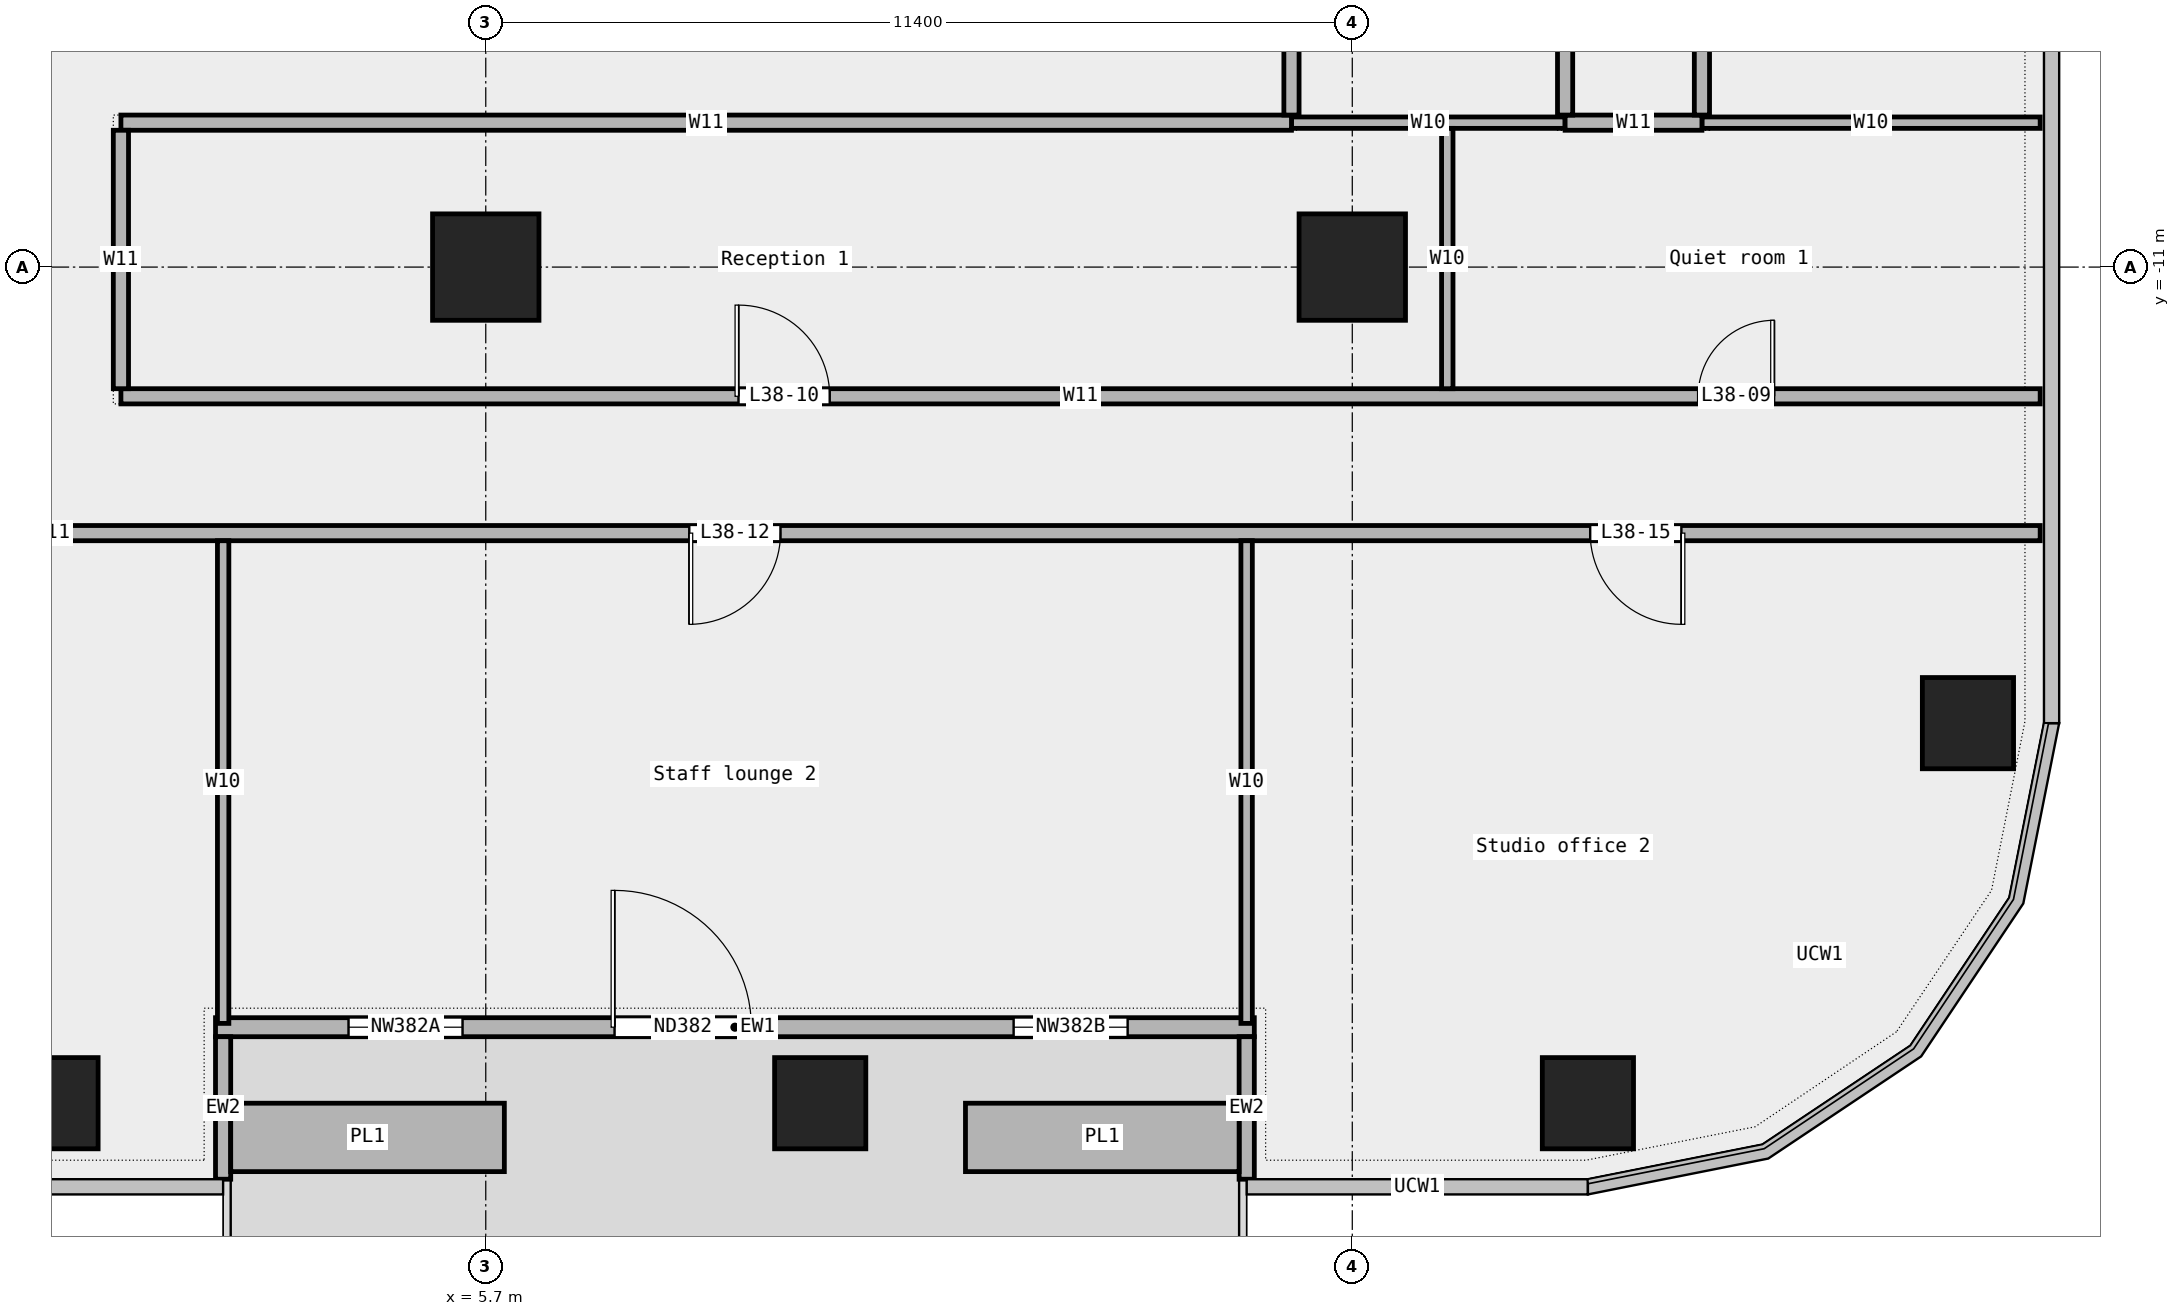
"""IFC4 building model, lengths in metres.
Left out: names, types, materials, properties, quantities, classifications, styles, units other than length and angle.
Written with IfcOpenShell. Run it as: python <this file> out.ifc"""

import sys

from ifc_helpers import new_model, si_unit, direction, frame, frame_2d, origin, origin_2d, place, context, subcontext, project, spatial, rectangle, extrude, element, fill, save


model = new_model("IFC4")
c1 = context("Model", 3, precision=1e-05, world=origin(), true_north=direction((0.0, 1.0)))
c2 = subcontext(c1, "Body", "Model", "MODEL_VIEW")
j1 = project(units=[si_unit("LENGTHUNIT", "METRE"), si_unit("PLANEANGLEUNIT", "RADIAN")], contexts=[c1])
p1 = place(None, origin())
s1 = spatial("IfcSite", under=j1, at=p1, CompositionType="ELEMENT")
p2 = place(p1, origin())
s2 = spatial("IfcBuilding", under=s1, at=p2, CompositionType="ELEMENT")
p3 = place(p2, frame((0.0, 0.0, 185.0)))
s3 = spatial("IfcBuildingStorey", under=s2, at=p3, CompositionType="ELEMENT", Elevation=185.0)
for number, where, z_axis, x_axis in (
    (1, (0.0, -22.0, 0.0), (0.0, 0.0, 1.0), (1.0, 0.0, 0.0)),
    (2, (10.1, -22.0, 0.0), (0.0, 0.0, 1.0), (1.0, 0.0, 0.0)),
    (3, (20.2, -22.0, 0.0), (0.0, 0.0, 1.0), (1.0, 0.0, 0.0)),
    (4, (25.2, -17.0, 0.0), (0.0, 0.0, 1.0), (1.0, 0.0, 0.0)),
):
    element("IfcColumn", number, at=place(p3, frame(where, z_axis=z_axis, x_axis=x_axis)), inside=s3, PredefinedType="COLUMN", context=c2, shape_type="SweptSolid", body=[
        extrude(rectangle(XDim=1.2, YDim=1.2, at=origin_2d()), origin(), (0.0, 0.0, 1.0), 3.6),
    ])
for number, where, z_axis, x_axis in (
    (5, (5.7, -11.0, 0.0), (0.0, 0.0, 1.0), (1.0, 0.0, 0.0)),
    (6, (17.1, -11.0, 0.0), (0.0, 0.0, 1.0), (1.0, 0.0, 0.0)),
):
    element("IfcColumn", number, at=place(p3, frame(where, z_axis=z_axis, x_axis=x_axis)), inside=s3, PredefinedType="COLUMN", context=c2, shape_type="SweptSolid", body=[
        extrude(rectangle(XDim=1.4, YDim=1.4, at=origin_2d()), origin(), (0.0, 0.0, 1.0), 3.6),
    ])
p4 = place(p3, frame((2.145, -21.0, 0.0), z_axis=(0.0, 0.0, 1.0), x_axis=(1.0, 0.0, 0.0)))
e7 = element("IfcWall", 7, at=p4, inside=s3, PredefinedType="STANDARD", context=c2, shape_type="SweptSolid", body=[
    extrude(rectangle(XDim=13.667, YDim=0.25, at=frame_2d((6.833, 0.0))), origin(), (0.0, 0.0, 1.0), 3.6),
])
p5 = place(p4, frame((1.75, 0.0, 0.45)))
e8 = element("IfcOpeningElement", 8, at=p5, cuts=e7, PredefinedType="OPENING", context=c2, shape_type="SweptSolid", body=[
    extrude(rectangle(XDim=1.5, YDim=2.4, at=frame_2d((0.75, 1.2))), frame((0.0, 0.137, 0.0), z_axis=(0.0, -1.0, 0.0), x_axis=(1.0, 0.0, 0.0)), (0.0, 0.0, 1.0), 0.274),
])
p6 = place(p4, frame((5.25, 0.0, 0.0)))
e9 = element("IfcOpeningElement", 9, at=p6, cuts=e7, PredefinedType="OPENING", context=c2, shape_type="SweptSolid", body=[
    extrude(rectangle(XDim=1.8, YDim=2.4, at=frame_2d((0.9, 1.2))), frame((0.0, 0.137, 0.0), z_axis=(0.0, -1.0, 0.0), x_axis=(1.0, 0.0, 0.0)), (0.0, 0.0, 1.0), 0.274),
])
p7 = place(p4, frame((10.5, 0.0, 0.45)))
e10 = element("IfcOpeningElement", 10, at=p7, cuts=e7, PredefinedType="OPENING", context=c2, shape_type="SweptSolid", body=[
    extrude(rectangle(XDim=1.5, YDim=2.4, at=frame_2d((0.75, 1.2))), frame((0.0, 0.137, 0.0), z_axis=(0.0, -1.0, 0.0), x_axis=(1.0, 0.0, 0.0)), (0.0, 0.0, 1.0), 0.274),
])
for number, where, z_axis, x_axis in (
    (11, (2.244, -23.0, 0.0), (0.0, 0.0, 1.0), (0.0, 1.0, 0.0)),
    (12, (15.711, -23.0, 0.0), (0.0, 0.0, 1.0), (0.0, 1.0, 0.0)),
):
    element("IfcWall", number, at=place(p3, frame(where, z_axis=z_axis, x_axis=x_axis)), inside=s3, PredefinedType="STANDARD", context=c2, shape_type="SweptSolid", body=[
        extrude(rectangle(XDim=1.875, YDim=0.2, at=frame_2d((0.938, 0.0))), origin(), (0.0, 0.0, 1.0), 3.6),
    ])
for number, where, z_axis, x_axis in (
    (13, (2.344, -22.45, 0.0), (0.0, 0.0, 1.0), (1.0, 0.0, 0.0)),
    (14, (12.011, -22.45, 0.0), (0.0, 0.0, 1.0), (1.0, 0.0, 0.0)),
):
    element("IfcWall", number, at=place(p3, frame(where, z_axis=z_axis, x_axis=x_axis)), inside=s3, PredefinedType="STANDARD", context=c2, shape_type="SweptSolid", body=[
        extrude(rectangle(XDim=3.6, YDim=0.9, at=frame_2d((1.8, 0.0))), origin(), (0.0, 0.0, 1.0), 0.7),
    ])
p8 = place(p3, frame((-26.15, -14.5, 0.0), z_axis=(0.0, 0.0, 1.0), x_axis=(1.0, 0.0, 0.0)))
e15 = element("IfcWall", 15, at=p8, inside=s3, PredefinedType="PARTITIONING", context=c2, shape_type="SweptSolid", body=[
    extrude(rectangle(XDim=52.3, YDim=0.2, at=frame_2d((26.15, 0.0))), origin(), (0.0, 0.0, 1.0), 3.6),
])
p9 = place(p8, frame((34.528, 0.0, 0.0)))
e16 = element("IfcOpeningElement", 16, at=p9, cuts=e15, PredefinedType="OPENING", context=c2, shape_type="SweptSolid", body=[
    extrude(rectangle(XDim=1.2, YDim=2.1, at=frame_2d((0.6, 1.05))), frame((0.0, 0.112, 0.0), z_axis=(0.0, -1.0, 0.0), x_axis=(1.0, 0.0, 0.0)), (0.0, 0.0, 1.0), 0.224),
])
p10 = place(p8, frame((13.397, 0.0, 0.0)))
e17 = element("IfcOpeningElement", 17, at=p10, cuts=e15, PredefinedType="OPENING", context=c2, shape_type="SweptSolid", body=[
    extrude(rectangle(XDim=1.8, YDim=2.1, at=frame_2d((0.9, 1.05))), frame((0.0, 0.112, 0.0), z_axis=(0.0, -1.0, 0.0), x_axis=(1.0, 0.0, 0.0)), (0.0, 0.0, 1.0), 0.224),
])
p11 = place(p8, frame((46.38, 0.0, 0.0)))
e18 = element("IfcOpeningElement", 18, at=p11, cuts=e15, PredefinedType="OPENING", context=c2, shape_type="SweptSolid", body=[
    extrude(rectangle(XDim=1.2, YDim=2.1, at=frame_2d((0.6, 1.05))), frame((0.0, 0.112, 0.0), z_axis=(0.0, -1.0, 0.0), x_axis=(1.0, 0.0, 0.0)), (0.0, 0.0, 1.0), 0.224),
])
p12 = place(p3, frame((0.9, -12.7, 0.0), z_axis=(0.0, 0.0, 1.0), x_axis=(1.0, 0.0, 0.0)))
e19 = element("IfcWall", 19, at=p12, inside=s3, PredefinedType="PARTITIONING", context=c2, shape_type="SweptSolid", body=[
    extrude(rectangle(XDim=25.25, YDim=0.2, at=frame_2d((12.625, 0.0))), origin(), (0.0, 0.0, 1.0), 3.6),
])
p13 = place(p12, frame((20.75, 0.0, 0.0)))
e20 = element("IfcOpeningElement", 20, at=p13, cuts=e19, PredefinedType="OPENING", context=c2, shape_type="SweptSolid", body=[
    extrude(rectangle(XDim=1.0, YDim=2.1, at=frame_2d((0.5, 1.05))), frame((0.0, 0.112, 0.0), z_axis=(0.0, -1.0, 0.0), x_axis=(1.0, 0.0, 0.0)), (0.0, 0.0, 1.0), 0.224),
])
p14 = place(p12, frame((8.125, 0.0, 0.0)))
e21 = element("IfcOpeningElement", 21, at=p14, cuts=e19, PredefinedType="OPENING", context=c2, shape_type="SweptSolid", body=[
    extrude(rectangle(XDim=1.2, YDim=2.1, at=frame_2d((0.6, 1.05))), frame((0.0, 0.112, 0.0), z_axis=(0.0, -1.0, 0.0), x_axis=(1.0, 0.0, 0.0)), (0.0, 0.0, 1.0), 0.224),
])
p15 = place(p3, frame((16.3, -9.1, 0.0), z_axis=(0.0, 0.0, 1.0), x_axis=(1.0, 0.0, 0.0)))
e22 = element("IfcWall", 22, at=p15, inside=s3, PredefinedType="PARTITIONING", context=c2, shape_type="SweptSolid", body=[
    extrude(rectangle(XDim=3.6, YDim=0.15, at=frame_2d((1.8, 0.0))), origin(), (0.0, 0.0, 1.0), 3.6),
])
p16 = place(p3, frame((21.7, -9.1, 0.0), z_axis=(0.0, 0.0, 1.0), x_axis=(1.0, 0.0, 0.0)))
e23 = element("IfcWall", 23, at=p16, inside=s3, PredefinedType="PARTITIONING", context=c2, shape_type="SweptSolid", body=[
    extrude(rectangle(XDim=4.45, YDim=0.15, at=frame_2d((2.225, 0.0))), origin(), (0.0, 0.0, 1.0), 3.6),
])
p17 = place(p3, frame((0.9, -9.1, 0.0), z_axis=(0.0, 0.0, 1.0), x_axis=(1.0, 0.0, 0.0)))
e24 = element("IfcWall", 24, at=p17, inside=s3, PredefinedType="PARTITIONING", context=c2, shape_type="SweptSolid", body=[
    extrude(rectangle(XDim=15.4, YDim=0.2, at=frame_2d((7.7, 0.0))), origin(), (0.0, 0.0, 1.0), 3.6),
])
p18 = place(p3, frame((19.9, -9.1, 0.0), z_axis=(0.0, 0.0, 1.0), x_axis=(1.0, 0.0, 0.0)))
e25 = element("IfcWall", 25, at=p18, inside=s3, PredefinedType="PARTITIONING", context=c2, shape_type="SweptSolid", body=[
    extrude(rectangle(XDim=1.8, YDim=0.2, at=frame_2d((0.9, 0.0))), origin(), (0.0, 0.0, 1.0), 3.6),
])
p19 = place(p3, frame((0.9, -12.6, 0.0), z_axis=(0.0, 0.0, 1.0), x_axis=(0.0, 1.0, 0.0)))
e26 = element("IfcWall", 26, at=p19, inside=s3, PredefinedType="PARTITIONING", context=c2, shape_type="SweptSolid", body=[
    extrude(rectangle(XDim=3.4, YDim=0.2, at=frame_2d((1.7, 0.0))), origin(), (0.0, 0.0, 1.0), 3.6),
])
for number, where, z_axis, x_axis in (
    (27, (2.245, -20.95, 0.0), (0.0, 0.0, 1.0), (0.0, 1.0, 0.0)),
    (28, (15.71, -20.95, 0.0), (0.0, 0.0, 1.0), (0.0, 1.0, 0.0)),
):
    element("IfcWall", number, at=place(p3, frame(where, z_axis=z_axis, x_axis=x_axis)), inside=s3, PredefinedType="PARTITIONING", context=c2, shape_type="SweptSolid", body=[
        extrude(rectangle(XDim=6.35, YDim=0.15, at=frame_2d((3.175, 0.0))), origin(), (0.0, 0.0, 1.0), 3.6),
    ])
p20 = place(p3, frame((16.3, -9.0, 0.0), z_axis=(0.0, 0.0, 1.0), x_axis=(0.0, 1.0, 0.0)))
e29 = element("IfcWall", 29, at=p20, inside=s3, PredefinedType="PARTITIONING", context=c2, shape_type="SweptSolid", body=[
    extrude(rectangle(XDim=8.3, YDim=0.2, at=frame_2d((4.15, 0.0))), origin(), (0.0, 0.0, 1.0), 3.6),
])
p21 = place(p3, frame((18.35, -12.6, 0.0), z_axis=(0.0, 0.0, 1.0), x_axis=(0.0, 1.0, 0.0)))
e30 = element("IfcWall", 30, at=p21, inside=s3, PredefinedType="PARTITIONING", context=c2, shape_type="SweptSolid", body=[
    extrude(rectangle(XDim=3.425, YDim=0.15, at=frame_2d((1.712, 0.0))), origin(), (0.0, 0.0, 1.0), 3.6),
])
p22 = place(p3, frame((19.9, -9.0, 0.0), z_axis=(0.0, 0.0, 1.0), x_axis=(0.0, 1.0, 0.0)))
e31 = element("IfcWall", 31, at=p22, inside=s3, PredefinedType="PARTITIONING", context=c2, shape_type="SweptSolid", body=[
    extrude(rectangle(XDim=9.95, YDim=0.2, at=frame_2d((4.975, 0.0))), origin(), (0.0, 0.0, 1.0), 3.6),
])
p23 = place(p22, frame((1.942, 0.0, 0.0)))
e32 = element("IfcOpeningElement", 32, at=p23, cuts=e31, PredefinedType="OPENING", context=c2, shape_type="SweptSolid", body=[
    extrude(rectangle(XDim=0.9, YDim=2.1, at=frame_2d((0.45, 1.05))), frame((0.0, 0.112, 0.0), z_axis=(0.0, -1.0, 0.0), x_axis=(1.0, 0.0, 0.0)), (0.0, 0.0, 1.0), 0.224),
])
p24 = place(p22, frame((6.917, 0.0, 0.0)))
e33 = element("IfcOpeningElement", 33, at=p24, cuts=e31, PredefinedType="OPENING", context=c2, shape_type="SweptSolid", body=[
    extrude(rectangle(XDim=0.9, YDim=2.1, at=frame_2d((0.45, 1.05))), frame((0.0, 0.112, 0.0), z_axis=(0.0, -1.0, 0.0), x_axis=(1.0, 0.0, 0.0)), (0.0, 0.0, 1.0), 0.224),
])
p25 = place(p3, frame((21.7, -9.0, 0.0), z_axis=(0.0, 0.0, 1.0), x_axis=(0.0, 1.0, 0.0)))
e34 = element("IfcWall", 34, at=p25, inside=s3, PredefinedType="PARTITIONING", context=c2, shape_type="SweptSolid", body=[
    extrude(rectangle(XDim=24.3, YDim=0.2, at=frame_2d((12.15, 0.0))), origin(), (0.0, 0.0, 1.0), 3.6),
])
p26 = place(p25, frame((18.155, 0.0, 0.0)))
e35 = element("IfcOpeningElement", 35, at=p26, cuts=e34, PredefinedType="OPENING", context=c2, shape_type="SweptSolid", body=[
    extrude(rectangle(XDim=1.5, YDim=2.1, at=frame_2d((0.75, 1.05))), frame((0.0, 0.112, 0.0), z_axis=(0.0, -1.0, 0.0), x_axis=(1.0, 0.0, 0.0)), (0.0, 0.0, 1.0), 0.224),
])
p27 = place(p25, frame((6.155, 0.0, 0.0)))
e36 = element("IfcOpeningElement", 36, at=p27, cuts=e34, PredefinedType="OPENING", context=c2, shape_type="SweptSolid", body=[
    extrude(rectangle(XDim=1.2, YDim=2.1, at=frame_2d((0.6, 1.05))), frame((0.0, 0.112, 0.0), z_axis=(0.0, -1.0, 0.0), x_axis=(1.0, 0.0, 0.0)), (0.0, 0.0, 1.0), 0.224),
])
p28 = place(p5, origin())
e37 = element("IfcWindow", 37, at=p28, inside=s3, PartitioningType="SINGLE_PANEL", PredefinedType="WINDOW", context=c2, shape_type="SweptSolid", body=[
    extrude(rectangle(XDim=1.5, YDim=2.4, at=frame_2d((0.75, 1.2))), frame((0.0, 0.03, 0.0), z_axis=(0.0, -1.0, 0.0), x_axis=(1.0, 0.0, 0.0)), (0.0, 0.0, 1.0), 0.06),
])
fill(e8, e37)
p29 = place(p6, origin())
e38 = element("IfcDoor", 38, at=p29, inside=s3, OperationType="DOUBLE_DOOR_SINGLE_SWING", PredefinedType="DOOR", context=c2, shape_type="SweptSolid", body=[
    extrude(rectangle(XDim=1.8, YDim=2.4, at=frame_2d((0.9, 1.2))), frame((0.0, 0.025, 0.0), z_axis=(0.0, -1.0, 0.0), x_axis=(1.0, 0.0, 0.0)), (0.0, 0.0, 1.0), 0.05),
])
fill(e9, e38)
p30 = place(p7, origin())
e39 = element("IfcWindow", 39, at=p30, inside=s3, PartitioningType="SINGLE_PANEL", PredefinedType="WINDOW", context=c2, shape_type="SweptSolid", body=[
    extrude(rectangle(XDim=1.5, YDim=2.4, at=frame_2d((0.75, 1.2))), frame((0.0, 0.03, 0.0), z_axis=(0.0, -1.0, 0.0), x_axis=(1.0, 0.0, 0.0)), (0.0, 0.0, 1.0), 0.06),
])
fill(e10, e39)
p31 = place(p13, origin())
e40 = element("IfcDoor", 40, at=p31, inside=s3, OperationType="SINGLE_SWING_RIGHT", PredefinedType="DOOR", context=c2, shape_type="SweptSolid", body=[
    extrude(rectangle(XDim=1.0, YDim=2.1, at=frame_2d((0.5, 1.05))), frame((0.0, 0.025, 0.0), z_axis=(0.0, -1.0, 0.0), x_axis=(1.0, 0.0, 0.0)), (0.0, 0.0, 1.0), 0.05),
])
fill(e20, e40)
p32 = place(p14, origin())
e41 = element("IfcDoor", 41, at=p32, inside=s3, OperationType="SINGLE_SWING_LEFT", PredefinedType="DOOR", context=c2, shape_type="SweptSolid", body=[
    extrude(rectangle(XDim=1.2, YDim=2.1, at=frame_2d((0.6, 1.05))), frame((0.0, 0.025, 0.0), z_axis=(0.0, -1.0, 0.0), x_axis=(1.0, 0.0, 0.0)), (0.0, 0.0, 1.0), 0.05),
])
fill(e21, e41)
p33 = place(p9, origin())
e42 = element("IfcDoor", 42, at=p33, inside=s3, OperationType="SINGLE_SWING_RIGHT", PredefinedType="DOOR", context=c2, shape_type="SweptSolid", body=[
    extrude(rectangle(XDim=1.2, YDim=2.1, at=frame_2d((0.6, 1.05))), frame((0.0, 0.025, 0.0), z_axis=(0.0, -1.0, 0.0), x_axis=(1.0, 0.0, 0.0)), (0.0, 0.0, 1.0), 0.05),
])
fill(e16, e42)
p34 = place(p11, origin())
e43 = element("IfcDoor", 43, at=p34, inside=s3, OperationType="SINGLE_SWING_LEFT", PredefinedType="DOOR", context=c2, shape_type="SweptSolid", body=[
    extrude(rectangle(XDim=1.2, YDim=2.1, at=frame_2d((0.6, 1.05))), frame((0.0, 0.025, 0.0), z_axis=(0.0, -1.0, 0.0), x_axis=(1.0, 0.0, 0.0)), (0.0, 0.0, 1.0), 0.05),
])
fill(e18, e43)
save(model, sys.argv[1])
